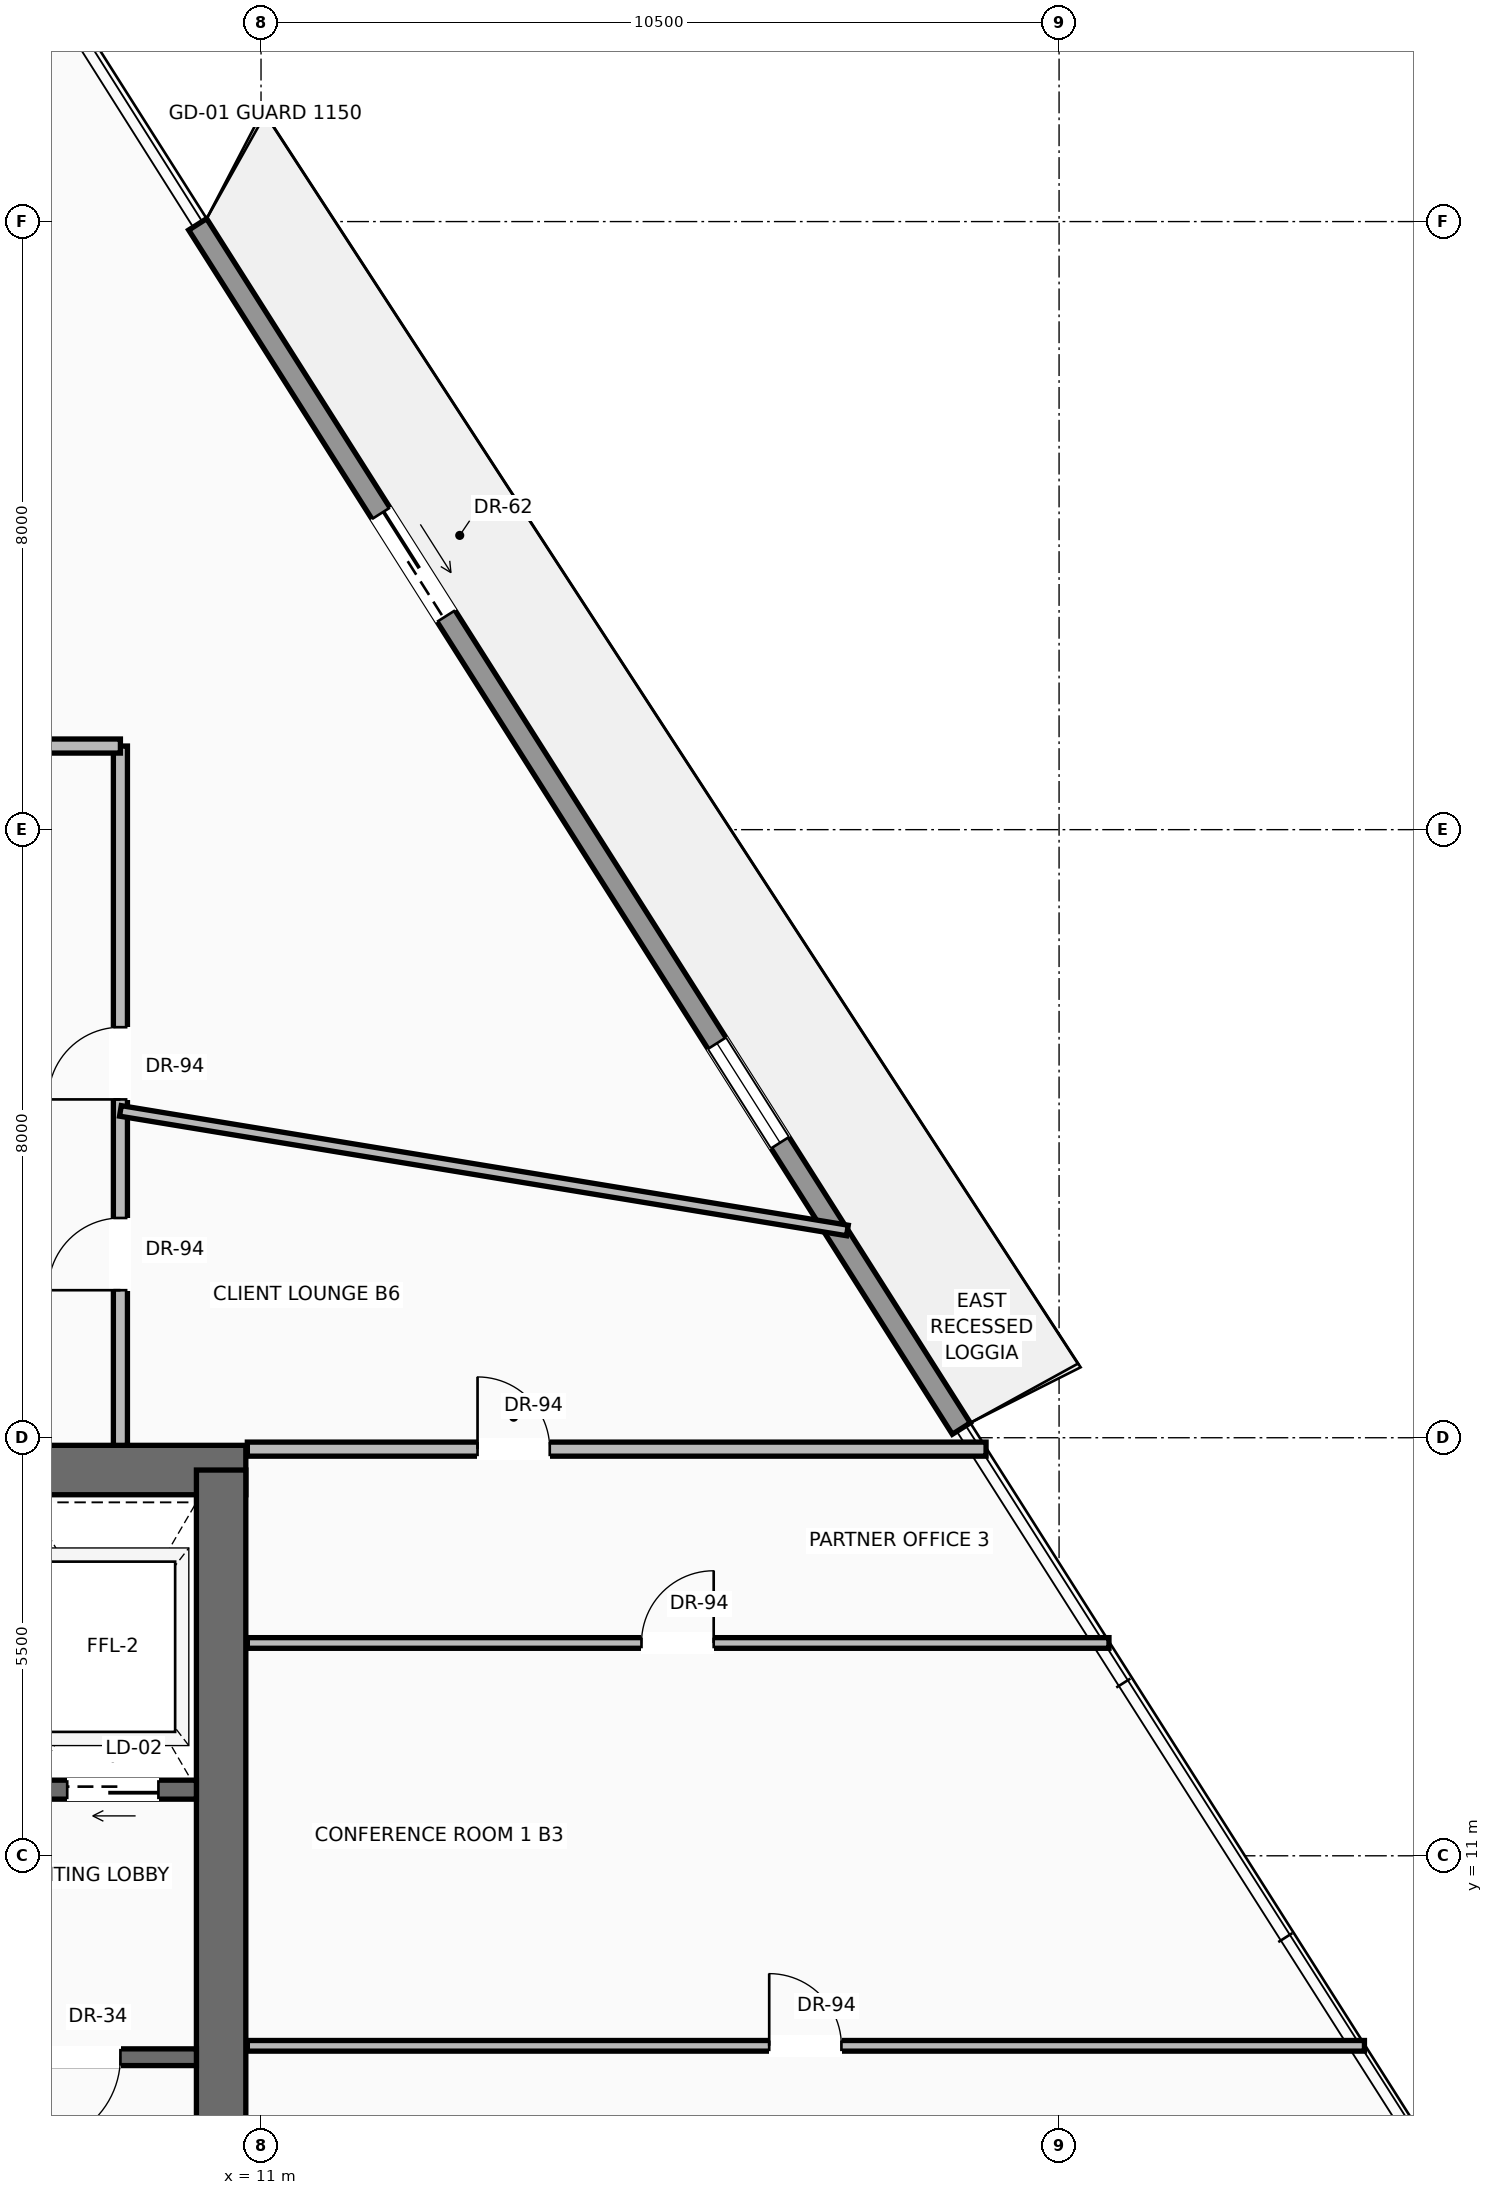
"""IFC4 building model, lengths in metres.
Left out: names, types, materials, properties, quantities, classifications, styles, units other than length and angle.
Written with IfcOpenShell. Run it as: python <this file> out.ifc"""

import sys

from ifc_helpers import new_model, si_unit, direction, frame, frame_2d, origin, place, context, subcontext, project, spatial, rectangle, extrude, source, transform, mapped, element, fill, save


model = new_model("IFC4")
c1 = context("Model", 3, precision=1e-05, world=origin(), true_north=direction((0.0, 1.0)))
c2 = subcontext(c1, "Body", "Model", "MODEL_VIEW")
j1 = project(units=[si_unit("LENGTHUNIT", "METRE"), si_unit("PLANEANGLEUNIT", "RADIAN")], contexts=[c1])
p1 = place(None, origin())
s1 = spatial("IfcSite", under=j1, at=p1, CompositionType="ELEMENT")
p2 = place(p1, origin())
s2 = spatial("IfcBuilding", under=s1, at=p2, CompositionType="ELEMENT")
p3 = place(p2, frame((0.0, 0.0, 178.4)))
s3 = spatial("IfcBuildingStorey", under=s2, at=p3, CompositionType="ELEMENT", Elevation=178.4)
p4 = place(p3, frame((-10.8, 16.075, 0.0), z_axis=(0.0, 0.0, 1.0), x_axis=(1.0, 0.0, 0.0)))
e1 = element("IfcWall", 1, at=p4, inside=s3, PredefinedType="SHEAR", context=c2, shape_type="SweptSolid", body=[
    extrude(rectangle(XDim=21.6, YDim=0.65, at=frame_2d((10.8, 0.0))), origin(), (0.0, 0.0, 1.0), 3.47),
])
p5 = place(p4, frame((3.37, 0.0, 0.0)))
e2 = element("IfcOpeningElement", 2, at=p5, cuts=e1, PredefinedType="OPENING", context=c2, shape_type="SweptSolid", body=[
    extrude(rectangle(XDim=1.3, YDim=2.3, at=frame_2d((0.65, 1.15))), frame((0.0, 0.335, 0.0), z_axis=(0.0, -1.0, 0.0), x_axis=(1.0, 0.0, 0.0)), (0.0, 0.0, 1.0), 0.67),
])
p6 = place(p4, frame((9.8, 0.0, 0.0)))
e3 = element("IfcOpeningElement", 3, at=p6, cuts=e1, PredefinedType="OPENING", context=c2, shape_type="SweptSolid", body=[
    extrude(rectangle(XDim=2.0, YDim=2.4, at=frame_2d((1.0, 1.2))), frame((0.0, 0.335, 0.0), z_axis=(0.0, -1.0, 0.0), x_axis=(1.0, 0.0, 0.0)), (0.0, 0.0, 1.0), 0.67),
])
p7 = place(p3, frame((10.475, 0.525, 0.0), z_axis=(0.0, 0.0, 1.0), x_axis=(0.0, 1.0, 0.0)))
e4 = element("IfcWall", 4, at=p7, inside=s3, PredefinedType="SHEAR", context=c2, shape_type="SweptSolid", body=[
    extrude(rectangle(XDim=15.55, YDim=0.65, at=frame_2d((7.775, 0.0))), origin(), (0.0, 0.0, 1.0), 3.47),
])
p8 = place(p3, frame((10.167, 32.463, 0.0), z_axis=(0.0, 0.0, 1.0), x_axis=(0.535575528783, -0.844487331444, 0.0)))
e5 = element("IfcWall", 5, at=p8, inside=s3, PredefinedType="SOLIDWALL", context=c2, shape_type="SweptSolid", body=[
    extrude(rectangle(XDim=18.76, YDim=0.28, at=frame_2d((9.38, 0.0))), origin(), (0.0, 0.0, 1.0), 3.05),
])
p9 = place(p8, frame((4.502, 0.0, 0.0)))
e6 = element("IfcOpeningElement", 6, at=p9, cuts=e5, PredefinedType="OPENING", context=c2, shape_type="SweptSolid", body=[
    extrude(rectangle(XDim=1.6, YDim=2.35, at=frame_2d((0.8, 1.175))), frame((0.0, 0.15, 0.0), z_axis=(0.0, -1.0, 0.0), x_axis=(1.0, 0.0, 0.0)), (0.0, 0.0, 1.0), 0.3),
])
p10 = place(p8, frame((12.757, 0.0, 0.9)))
e7 = element("IfcOpeningElement", 7, at=p10, cuts=e5, PredefinedType="OPENING", context=c2, shape_type="SweptSolid", body=[
    extrude(rectangle(XDim=1.55, YDim=1.85, at=frame_2d((0.775, 0.925))), frame((0.0, 0.15, 0.0), z_axis=(0.0, -1.0, 0.0), x_axis=(1.0, 0.0, 0.0)), (0.0, 0.0, 1.0), 0.3),
])
p11 = place(p3, frame((10.15, 8.35, 0.0), z_axis=(0.0, 0.0, 1.0), x_axis=(-1.0, 0.0, 0.0)))
e8 = element("IfcWall", 8, at=p11, inside=s3, PredefinedType="SOLIDWALL", context=c2, shape_type="SweptSolid", body=[
    extrude(rectangle(XDim=4.65, YDim=0.22, at=frame_2d((2.325, 0.0))), origin(), (0.0, 0.0, 1.0), 3.47),
])
p12 = place(p11, frame((1.0, 0.0, 0.0)))
e9 = element("IfcOpeningElement", 9, at=p12, cuts=e8, PredefinedType="OPENING", context=c2, shape_type="SweptSolid", body=[
    extrude(rectangle(XDim=1.15, YDim=2.2, at=frame_2d((0.575, 1.1))), frame((0.0, 0.12, 0.0), z_axis=(0.0, -1.0, 0.0), x_axis=(1.0, 0.0, 0.0)), (0.0, 0.0, 1.0), 0.24),
])
p13 = place(p3, frame((10.15, 11.87, 0.0), z_axis=(0.0, 0.0, 1.0), x_axis=(-1.0, 0.0, 0.0)))
e10 = element("IfcWall", 10, at=p13, inside=s3, PredefinedType="SOLIDWALL", context=c2, shape_type="SweptSolid", body=[
    extrude(rectangle(XDim=4.65, YDim=0.25, at=frame_2d((2.325, 0.0))), origin(), (0.0, 0.0, 1.0), 3.47),
])
p14 = place(p13, frame((0.5, 0.0, 0.0)))
e11 = element("IfcOpeningElement", 11, at=p14, cuts=e10, PredefinedType="OPENING", context=c2, shape_type="SweptSolid", body=[
    extrude(rectangle(XDim=1.2, YDim=2.25, at=frame_2d((0.6, 1.125))), frame((0.0, 0.135, 0.0), z_axis=(0.0, -1.0, 0.0), x_axis=(1.0, 0.0, 0.0)), (0.0, 0.0, 1.0), 0.27),
])
p15 = place(p3, frame((9.15, 16.4, 0.0), z_axis=(0.0, 0.0, 1.0), x_axis=(0.0, 1.0, 0.0)))
e12 = element("IfcWall", 12, at=p15, inside=s3, PredefinedType="PARTITIONING", context=c2, shape_type="SweptSolid", body=[
    extrude(rectangle(XDim=9.2, YDim=0.185, at=frame_2d((4.6, 0.0))), origin(), (0.0, 0.0, 1.0), 2.846),
])
p16 = place(p15, frame((4.551, 0.0, 0.0)))
e13 = element("IfcOpeningElement", 13, at=p16, cuts=e12, PredefinedType="OPENING", context=c2, shape_type="SweptSolid", body=[
    extrude(rectangle(XDim=0.95, YDim=2.2, at=frame_2d((0.475, 1.1))), frame((0.0, 0.103, 0.0), z_axis=(0.0, -1.0, 0.0), x_axis=(1.0, 0.0, 0.0)), (0.0, 0.0, 1.0), 0.205),
])
p17 = place(p15, frame((2.041, 0.0, 0.0)))
e14 = element("IfcOpeningElement", 14, at=p17, cuts=e12, PredefinedType="OPENING", context=c2, shape_type="SweptSolid", body=[
    extrude(rectangle(XDim=0.95, YDim=2.2, at=frame_2d((0.475, 1.1))), frame((0.0, 0.103, 0.0), z_axis=(0.0, -1.0, 0.0), x_axis=(1.0, 0.0, 0.0)), (0.0, 0.0, 1.0), 0.205),
])
p18 = place(p3, frame((6.95, 25.6, 0.0), z_axis=(0.0, 0.0, 1.0), x_axis=(1.0, 0.0, 0.0)))
e15 = element("IfcWall", 15, at=p18, inside=s3, PredefinedType="PARTITIONING", context=c2, shape_type="SweptSolid", body=[
    extrude(rectangle(XDim=2.2, YDim=0.185, at=frame_2d((1.1, 0.0))), origin(), (0.0, 0.0, 1.0), 3.462),
])
p19 = place(p3, frame((10.82, 16.35, 0.0), z_axis=(0.0, 0.0, 1.0), x_axis=(1.0, 0.0, 0.0)))
e16 = element("IfcWall", 16, at=p19, inside=s3, PredefinedType="PARTITIONING", context=c2, shape_type="SweptSolid", body=[
    extrude(rectangle(XDim=9.719, YDim=0.185, at=frame_2d((4.86, 0.0))), origin(), (0.0, 0.0, 1.0), 3.462),
])
p20 = place(p19, frame((3.029, 0.0, 0.0)))
e17 = element("IfcOpeningElement", 17, at=p20, cuts=e16, PredefinedType="OPENING", context=c2, shape_type="SweptSolid", body=[
    extrude(rectangle(XDim=0.95, YDim=2.2, at=frame_2d((0.475, 1.1))), frame((0.0, 0.103, 0.0), z_axis=(0.0, -1.0, 0.0), x_axis=(1.0, 0.0, 0.0)), (0.0, 0.0, 1.0), 0.205),
])
p21 = place(p3, frame((10.82, 8.5, 0.0), z_axis=(0.0, 0.0, 1.0), x_axis=(1.0, 0.0, 0.0)))
e18 = element("IfcWall", 18, at=p21, inside=s3, PredefinedType="PARTITIONING", context=c2, shape_type="SweptSolid", body=[
    extrude(rectangle(XDim=14.698, YDim=0.14, at=frame_2d((7.349, 0.0))), origin(), (0.0, 0.0, 1.0), 3.462),
])
p22 = place(p21, frame((6.866, 0.0, 0.0)))
e19 = element("IfcOpeningElement", 19, at=p22, cuts=e18, PredefinedType="OPENING", context=c2, shape_type="SweptSolid", body=[
    extrude(rectangle(XDim=0.95, YDim=2.2, at=frame_2d((0.475, 1.1))), frame((0.0, 0.08, 0.0), z_axis=(0.0, -1.0, 0.0), x_axis=(1.0, 0.0, 0.0)), (0.0, 0.0, 1.0), 0.16),
])
p23 = place(p3, frame((10.82, 13.8, 0.0), z_axis=(0.0, 0.0, 1.0), x_axis=(1.0, 0.0, 0.0)))
e20 = element("IfcWall", 20, at=p23, inside=s3, PredefinedType="PARTITIONING", context=c2, shape_type="SweptSolid", body=[
    extrude(rectangle(XDim=11.336, YDim=0.14, at=frame_2d((5.668, 0.0))), origin(), (0.0, 0.0, 1.0), 3.462),
])
p24 = place(p23, frame((5.186, 0.0, 0.0)))
e21 = element("IfcOpeningElement", 21, at=p24, cuts=e20, PredefinedType="OPENING", context=c2, shape_type="SweptSolid", body=[
    extrude(rectangle(XDim=0.95, YDim=2.2, at=frame_2d((0.475, 1.1))), frame((0.0, 0.08, 0.0), z_axis=(0.0, -1.0, 0.0), x_axis=(1.0, 0.0, 0.0)), (0.0, 0.0, 1.0), 0.16),
])
p25 = place(p3, frame((9.15, 20.8, 0.0), z_axis=(0.0, 0.0, 1.0), x_axis=(0.986738202505, -0.162319806916, 0.0)))
e22 = element("IfcWall", 22, at=p25, inside=s3, PredefinedType="PARTITIONING", context=c2, shape_type="SweptSolid", body=[
    extrude(rectangle(XDim=9.694, YDim=0.14, at=frame_2d((4.847, 0.0))), origin(), (0.0, 0.0, 1.0), 3.049),
])
m1 = source(origin(), c2, "Body", "SweptSolid", [
    extrude(rectangle(XDim=1.6, YDim=2.35, at=frame_2d((0.8, 1.175))), frame((0.0, 0.025, 0.0), z_axis=(0.0, -1.0, 0.0), x_axis=(1.0, 0.0, 0.0)), (0.0, 0.0, 1.0), 0.05),
])
p26 = place(p9, origin())
e23 = element("IfcDoor", 23, at=p26, inside=s3, OperationType="SLIDING_TO_RIGHT", PredefinedType="DOOR", context=c2, shape_type="MappedRepresentation", body=[
    mapped(m1, transform((0.0, 0.0, 0.0), scale=1.0)),
])
fill(e6, e23)
m2 = source(origin(), c2, "Body", "SweptSolid", [
    extrude(rectangle(XDim=1.55, YDim=1.85, at=frame_2d((0.775, 0.925))), frame((0.0, 0.03, 0.0), z_axis=(0.0, -1.0, 0.0), x_axis=(1.0, 0.0, 0.0)), (0.0, 0.0, 1.0), 0.06),
])
p27 = place(p10, origin())
e24 = element("IfcWindow", 24, at=p27, inside=s3, PartitioningType="SINGLE_PANEL", PredefinedType="WINDOW", context=c2, shape_type="MappedRepresentation", body=[
    mapped(m2, transform((0.0, 0.0, 0.0), scale=1.0)),
])
fill(e7, e24)
m3 = source(origin(), c2, "Body", "SweptSolid", [
    extrude(rectangle(XDim=1.15, YDim=2.2, at=frame_2d((0.575, 1.1))), frame((0.0, 0.025, 0.0), z_axis=(0.0, -1.0, 0.0), x_axis=(1.0, 0.0, 0.0)), (0.0, 0.0, 1.0), 0.05),
])
p28 = place(p12, origin())
e25 = element("IfcDoor", 25, at=p28, inside=s3, OperationType="SINGLE_SWING_RIGHT", PredefinedType="DOOR", context=c2, shape_type="MappedRepresentation", body=[
    mapped(m3, transform((0.0, 0.0, 0.0), scale=1.0)),
])
fill(e9, e25)
m4 = source(origin(), c2, "Body", "SweptSolid", [
    extrude(rectangle(XDim=1.2, YDim=2.25, at=frame_2d((0.6, 1.125))), frame((0.0, 0.025, 0.0), z_axis=(0.0, -1.0, 0.0), x_axis=(1.0, 0.0, 0.0)), (0.0, 0.0, 1.0), 0.05),
])
p29 = place(p14, origin())
e26 = element("IfcDoor", 26, at=p29, inside=s3, OperationType="SLIDING_TO_RIGHT", PredefinedType="DOOR", context=c2, shape_type="MappedRepresentation", body=[
    mapped(m4, transform((0.0, 0.0, 0.0), scale=1.0)),
])
fill(e11, e26)
m5 = source(origin(), c2, "Body", "SweptSolid", [
    extrude(rectangle(XDim=0.95, YDim=2.2, at=frame_2d((0.475, 1.1))), frame((0.0, 0.025, 0.0), z_axis=(0.0, -1.0, 0.0), x_axis=(1.0, 0.0, 0.0)), (0.0, 0.0, 1.0), 0.05),
])
p30 = place(p16, origin())
e27 = element("IfcDoor", 27, at=p30, inside=s3, OperationType="SINGLE_SWING_LEFT", PredefinedType="DOOR", context=c2, shape_type="MappedRepresentation", body=[
    mapped(m5, transform((0.0, 0.0, 0.0), scale=1.0)),
])
fill(e13, e27)
p31 = place(p20, origin())
e28 = element("IfcDoor", 28, at=p31, inside=s3, OperationType="SINGLE_SWING_LEFT", PredefinedType="DOOR", context=c2, shape_type="MappedRepresentation", body=[
    mapped(m5, transform((0.0, 0.0, 0.0), scale=1.0)),
])
fill(e17, e28)
p32 = place(p17, origin())
e29 = element("IfcDoor", 29, at=p32, inside=s3, OperationType="SINGLE_SWING_LEFT", PredefinedType="DOOR", context=c2, shape_type="MappedRepresentation", body=[
    mapped(m5, transform((0.0, 0.0, 0.0), scale=1.0)),
])
fill(e14, e29)
p33 = place(p24, origin())
e30 = element("IfcDoor", 30, at=p33, inside=s3, OperationType="SINGLE_SWING_RIGHT", PredefinedType="DOOR", context=c2, shape_type="MappedRepresentation", body=[
    mapped(m5, transform((0.0, 0.0, 0.0), scale=1.0)),
])
fill(e21, e30)
p34 = place(p22, origin())
e31 = element("IfcDoor", 31, at=p34, inside=s3, OperationType="SINGLE_SWING_LEFT", PredefinedType="DOOR", context=c2, shape_type="MappedRepresentation", body=[
    mapped(m5, transform((0.0, 0.0, 0.0), scale=1.0)),
])
fill(e19, e31)
save(model, sys.argv[1])
